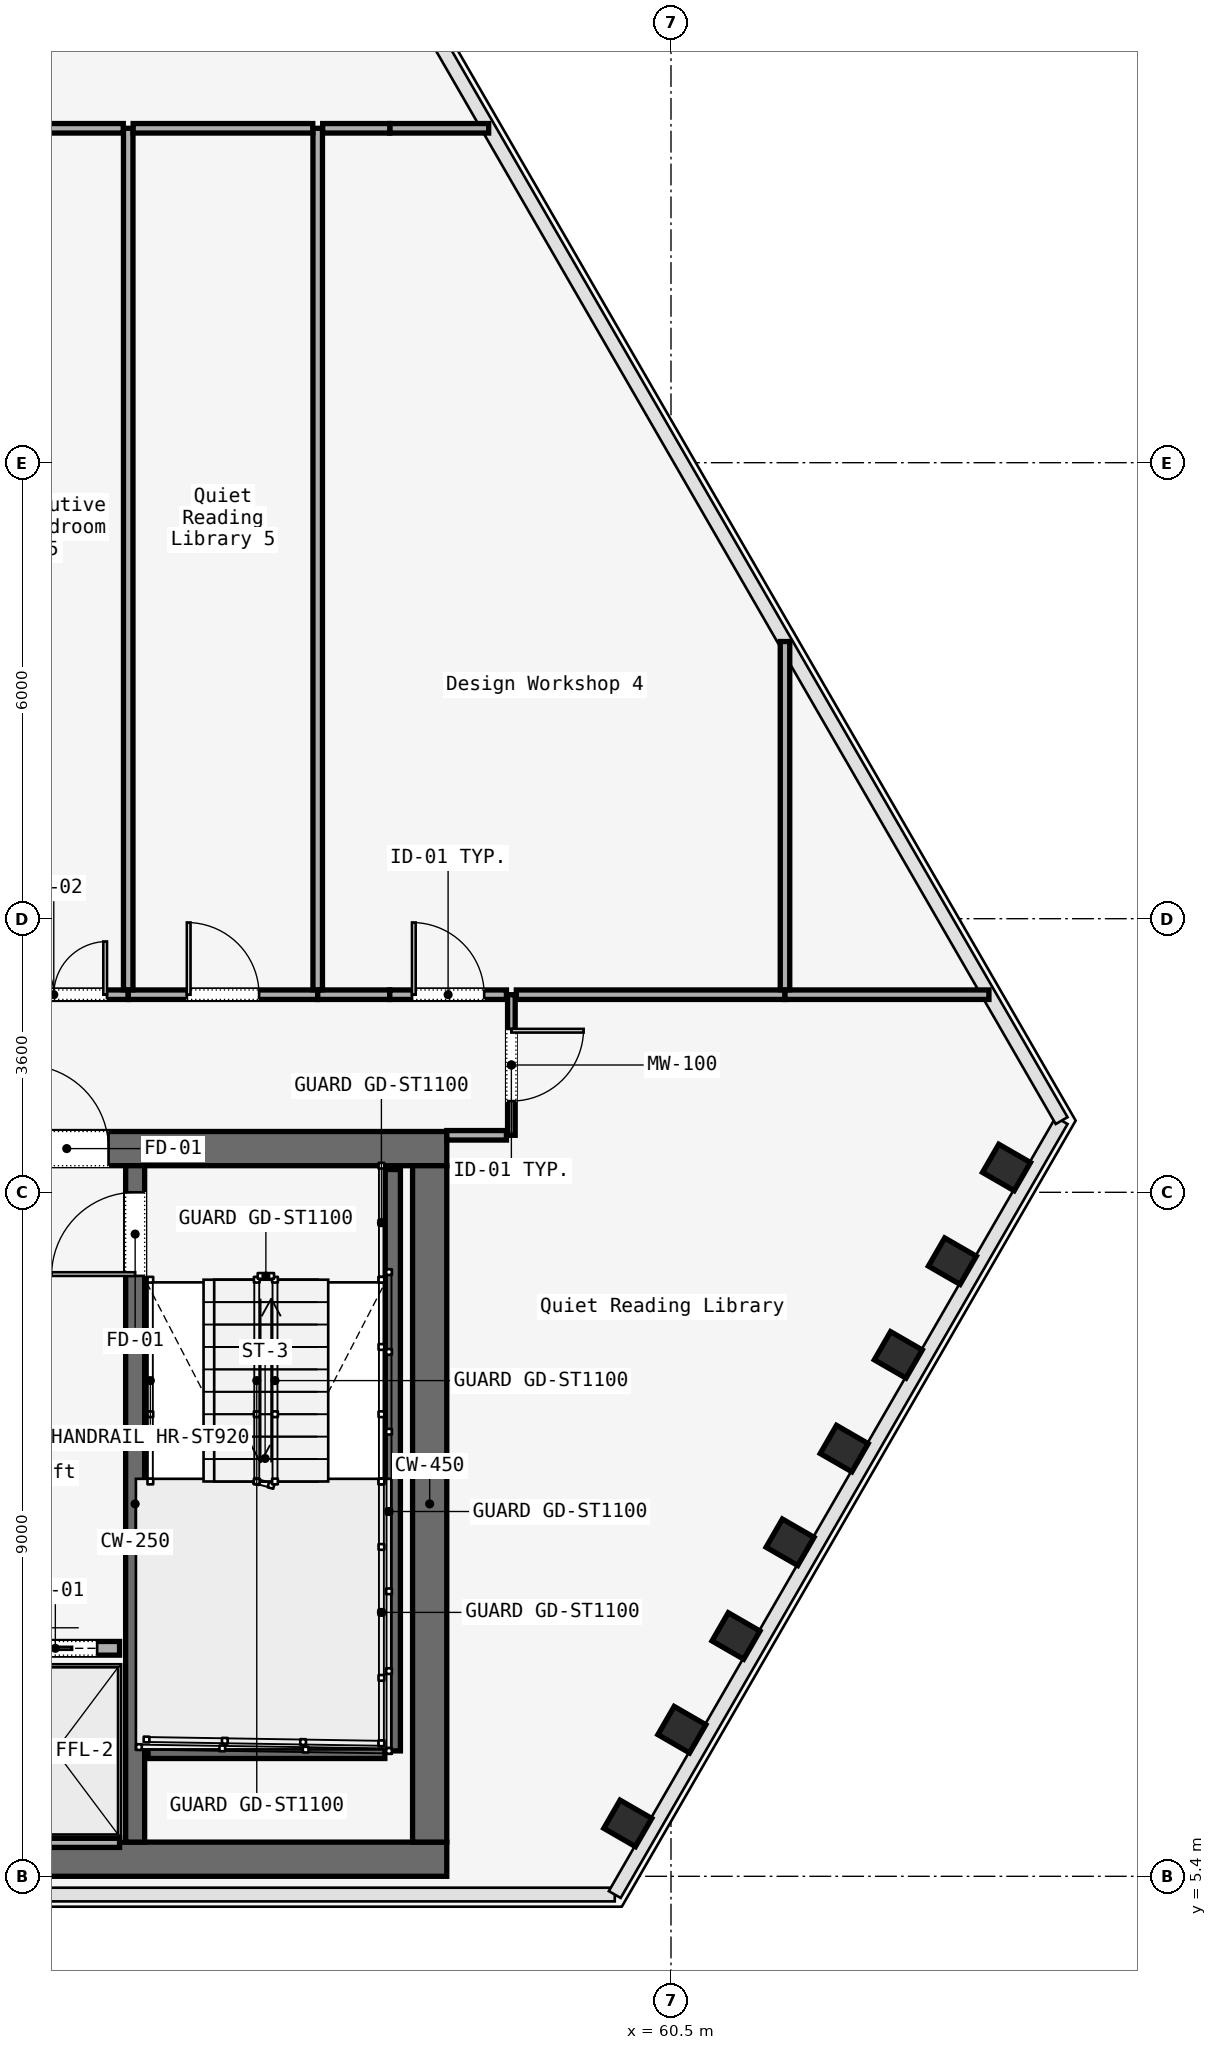
"""IFC4 building model, lengths in metres.
Left out: names, types, materials, properties, quantities, classifications, styles, units other than length and angle.
Written with IfcOpenShell. Run it as: python <this file> out.ifc"""

import sys

from ifc_helpers import new_model, si_unit, direction, frame, frame_2d, origin, origin_2d, place, context, subcontext, project, spatial, rectangle, i_section, extrude, element, fill, save


model = new_model("IFC4")
c1 = context("Model", 3, precision=1e-05, world=origin(), true_north=direction((0.0, 1.0)))
c2 = subcontext(c1, "Body", "Model", "MODEL_VIEW")
j1 = project(units=[si_unit("LENGTHUNIT", "METRE"), si_unit("PLANEANGLEUNIT", "RADIAN")], contexts=[c1])
p1 = place(None, origin())
s1 = spatial("IfcSite", under=j1, at=p1, CompositionType="ELEMENT")
p2 = place(p1, origin())
s2 = spatial("IfcBuilding", under=s1, at=p2, CompositionType="ELEMENT")
p3 = place(p2, frame((0.0, 0.0, 142.2)))
s3 = spatial("IfcBuildingStorey", under=s2, at=p3, CompositionType="ELEMENT", Elevation=142.2)
p4 = place(p3, frame((26.45, 14.975, 0.0), z_axis=(0.0, 0.0, 1.0), x_axis=(1.0, 0.0, 0.0)))
e1 = element("IfcWall", 1, at=p4, inside=s3, PredefinedType="SOLIDWALL", context=c2, shape_type="SweptSolid", body=[
    extrude(rectangle(XDim=31.1, YDim=0.45, at=frame_2d((15.55, 0.0))), origin(), (0.0, 0.0, 1.0), 3.58),
])
p5 = place(p4, frame((1.65, 0.0, 0.0)))
e2 = element("IfcOpeningElement", 2, at=p5, cuts=e1, PredefinedType="OPENING", context=c2, shape_type="SweptSolid", body=[
    extrude(rectangle(XDim=1.1, YDim=2.2, at=frame_2d((0.55, 1.1))), frame((0.0, 0.225, 0.0), z_axis=(0.0, -1.0, 0.0), x_axis=(1.0, 0.0, 0.0)), (0.0, 0.0, 1.0), 0.45),
])
p6 = place(p4, frame((13.65, 0.0, 0.0)))
e3 = element("IfcOpeningElement", 3, at=p6, cuts=e1, PredefinedType="OPENING", context=c2, shape_type="SweptSolid", body=[
    extrude(rectangle(XDim=1.1, YDim=2.2, at=frame_2d((0.55, 1.1))), frame((0.0, 0.225, 0.0), z_axis=(0.0, -1.0, 0.0), x_axis=(1.0, 0.0, 0.0)), (0.0, 0.0, 1.0), 0.45),
])
p7 = place(p4, frame((25.55, 0.0, 0.0)))
e4 = element("IfcOpeningElement", 4, at=p7, cuts=e1, PredefinedType="OPENING", context=c2, shape_type="SweptSolid", body=[
    extrude(rectangle(XDim=1.1, YDim=2.2, at=frame_2d((0.55, 1.1))), frame((0.0, 0.225, 0.0), z_axis=(0.0, -1.0, 0.0), x_axis=(1.0, 0.0, 0.0)), (0.0, 0.0, 1.0), 0.45),
])
p8 = place(p4, frame((10.7, 0.0, 0.0)))
e5 = element("IfcOpeningElement", 5, at=p8, cuts=e1, PredefinedType="OPENING", context=c2, shape_type="SweptSolid", body=[
    extrude(rectangle(XDim=1.4, YDim=2.2, at=frame_2d((0.7, 1.1))), frame((0.0, 0.225, 0.0), z_axis=(0.0, -1.0, 0.0), x_axis=(1.0, 0.0, 0.0)), (0.0, 0.0, 1.0), 0.45),
])
p9 = place(p4, frame((19.35, 0.0, 0.0)))
e6 = element("IfcOpeningElement", 6, at=p9, cuts=e1, PredefinedType="OPENING", context=c2, shape_type="SweptSolid", body=[
    extrude(rectangle(XDim=1.1, YDim=2.2, at=frame_2d((0.55, 1.1))), frame((0.0, 0.225, 0.0), z_axis=(0.0, -1.0, 0.0), x_axis=(1.0, 0.0, 0.0)), (0.0, 0.0, 1.0), 0.45),
])
p10 = place(p4, frame((21.4, 0.0, 0.0)))
e7 = element("IfcOpeningElement", 7, at=p10, cuts=e1, PredefinedType="OPENING", context=c2, shape_type="SweptSolid", body=[
    extrude(rectangle(XDim=0.9, YDim=2.1, at=frame_2d((0.45, 1.05))), frame((0.0, 0.225, 0.0), z_axis=(0.0, -1.0, 0.0), x_axis=(1.0, 0.0, 0.0)), (0.0, 0.0, 1.0), 0.45),
])
p11 = place(p4, frame((23.35, 0.0, 0.0)))
e8 = element("IfcOpeningElement", 8, at=p11, cuts=e1, PredefinedType="OPENING", context=c2, shape_type="SweptSolid", body=[
    extrude(rectangle(XDim=1.3, YDim=2.3, at=frame_2d((0.65, 1.15))), frame((0.0, 0.225, 0.0), z_axis=(0.0, -1.0, 0.0), x_axis=(1.0, 0.0, 0.0)), (0.0, 0.0, 1.0), 0.45),
])
p12 = place(p3, frame((26.45, 5.625, 0.0), z_axis=(0.0, 0.0, 1.0), x_axis=(1.0, 0.0, 0.0)))
e9 = element("IfcWall", 9, at=p12, inside=s3, PredefinedType="SOLIDWALL", context=c2, shape_type="SweptSolid", body=[
    extrude(rectangle(XDim=31.1, YDim=0.45, at=frame_2d((15.55, 0.0))), origin(), (0.0, 0.0, 1.0), 3.58),
])
p13 = place(p3, frame((57.325, 5.85, 0.0), z_axis=(0.0, 0.0, 1.0), x_axis=(0.0, 1.0, 0.0)))
e10 = element("IfcWall", 10, at=p13, inside=s3, PredefinedType="SOLIDWALL", context=c2, shape_type="SweptSolid", body=[
    extrude(rectangle(XDim=8.9, YDim=0.45, at=frame_2d((4.45, 0.0))), origin(), (0.0, 0.0, 1.0), 3.58),
])
p14 = place(p3, frame((53.45, 5.85, 0.0), z_axis=(0.0, 0.0, 1.0), x_axis=(0.0, 1.0, 0.0)))
e11 = element("IfcWall", 11, at=p14, inside=s3, PredefinedType="SOLIDWALL", context=c2, shape_type="SweptSolid", body=[
    extrude(rectangle(XDim=8.9, YDim=0.25, at=frame_2d((4.45, 0.0))), origin(), (0.0, 0.0, 1.0), 3.58),
])
p15 = place(p14, frame((7.45, 0.0, 0.0)))
e12 = element("IfcOpeningElement", 12, at=p15, cuts=e11, PredefinedType="OPENING", context=c2, shape_type="SweptSolid", body=[
    extrude(rectangle(XDim=1.1, YDim=2.2, at=frame_2d((0.55, 1.1))), frame((0.0, 0.125, 0.0), z_axis=(0.0, -1.0, 0.0), x_axis=(1.0, 0.0, 0.0)), (0.0, 0.0, 1.0), 0.25),
])
for number, where, z_axis, x_axis in (
    (13, (59.931, 6.096, 0.0), (0.0, 0.0, 1.0), (0.5, 0.866, 0.0)),
    (14, (60.643, 7.329, 0.0), (0.0, 0.0, 1.0), (0.5, 0.866, 0.0)),
    (15, (61.355, 8.562, 0.0), (0.0, 0.0, 1.0), (0.5, 0.866, 0.0)),
    (16, (62.067, 9.795, 0.0), (0.0, 0.0, 1.0), (0.5, 0.866, 0.0)),
    (17, (62.779, 11.028, 0.0), (0.0, 0.0, 1.0), (0.5, 0.866, 0.0)),
    (18, (63.49, 12.261, 0.0), (0.0, 0.0, 1.0), (0.5, 0.866, 0.0)),
    (19, (64.202, 13.494, 0.0), (0.0, 0.0, 1.0), (0.5, 0.866, 0.0)),
    (20, (64.914, 14.727, 0.0), (0.0, 0.0, 1.0), (0.5, 0.866, 0.0)),
):
    element("IfcColumn", number, at=place(p3, frame(where, z_axis=z_axis, x_axis=x_axis)), inside=s3, PredefinedType="COLUMN", context=c2, shape_type="SweptSolid", body=[
        extrude(i_section(OverallWidth=0.428, OverallDepth=0.481, WebThickness=0.051, FlangeThickness=0.065, FilletRadius=0.015, at=origin_2d()), origin(), (0.0, 0.0, 1.0), 3.58),
    ])
p16 = place(p3, frame((56.84, 14.7, 0.0), z_axis=(0.0, 0.0, 1.0), x_axis=(0.0, -1.0, 0.0)))
e21 = element("IfcWall", 21, at=p16, inside=s3, PredefinedType="SOLIDWALL", context=c2, shape_type="SweptSolid", body=[
    extrude(rectangle(XDim=7.65, YDim=0.2, at=frame_2d((3.825, 0.0))), origin(), (0.0, 0.0, 1.0), 3.8),
])
p17 = place(p3, frame((53.62, 7.05, 0.0), z_axis=(0.0, 0.0, 1.0), x_axis=(1.0, 0.0, 0.0)))
e22 = element("IfcWall", 22, at=p17, inside=s3, PredefinedType="SOLIDWALL", context=c2, shape_type="SweptSolid", body=[
    extrude(rectangle(XDim=3.115, YDim=0.2, at=frame_2d((1.558, 0.0))), origin(), (0.0, 0.0, 1.0), 3.8),
])
p18 = place(p3, frame((51.555, 8.4, 0.0), z_axis=(0.0, 0.0, 1.0), x_axis=(1.0, 0.0, 0.0)))
e23 = element("IfcWall", 23, at=p18, inside=s3, PredefinedType="SOLIDWALL", context=c2, shape_type="SweptSolid", body=[
    extrude(rectangle(XDim=1.69, YDim=0.18, at=frame_2d((0.845, 0.0))), origin(), (0.0, 0.0, 1.0), 3.01),
])
p19 = place(p18, frame((0.295, 0.0, 0.0)))
e24 = element("IfcOpeningElement", 24, at=p19, cuts=e23, PredefinedType="OPENING", context=c2, shape_type="SweptSolid", body=[
    extrude(rectangle(XDim=1.1, YDim=2.2, at=frame_2d((0.55, 1.1))), frame((0.0, 0.09, 0.0), z_axis=(0.0, -1.0, 0.0), x_axis=(1.0, 0.0, 0.0)), (0.0, 0.0, 1.0), 0.18),
])
p20 = place(p3, frame((51.555, 5.84, 0.0), z_axis=(0.0, 0.0, 1.0), x_axis=(1.0, 0.0, 0.0)))
e25 = element("IfcWall", 25, at=p20, inside=s3, PredefinedType="SOLIDWALL", context=c2, shape_type="SweptSolid", body=[
    extrude(rectangle(XDim=1.69, YDim=0.12, at=frame_2d((0.845, 0.0))), origin(), (0.0, 0.0, 1.0), 3.01),
])
p21 = place(p3, frame((58.4, 17.0, 0.0), z_axis=(0.0, 0.0, 1.0), x_axis=(0.0, -1.0, 0.0)))
e26 = element("IfcWall", 26, at=p21, inside=s3, PredefinedType="MOVABLE", context=c2, shape_type="SweptSolid", body=[
    extrude(rectangle(XDim=1.85, YDim=0.1, at=frame_2d((0.925, 0.0))), origin(), (0.0, 0.0, 1.0), 3.01),
])
p22 = place(p21, frame((0.45, 0.0, 0.0)))
e27 = element("IfcOpeningElement", 27, at=p22, cuts=e26, PredefinedType="OPENING", context=c2, shape_type="SweptSolid", body=[
    extrude(rectangle(XDim=0.95, YDim=2.2, at=frame_2d((0.475, 1.1))), frame((0.0, 0.05, 0.0), z_axis=(0.0, -1.0, 0.0), x_axis=(1.0, 0.0, 0.0)), (0.0, 0.0, 1.0), 0.1),
])
p23 = place(p3, frame((58.335, 15.15, 0.0), z_axis=(0.0, 0.0, 1.0), x_axis=(-1.0, 0.0, 0.0)))
e28 = element("IfcWall", 28, at=p23, inside=s3, PredefinedType="PARTITIONING", context=c2, shape_type="SweptSolid", body=[
    extrude(rectangle(XDim=0.785, YDim=0.125, at=frame_2d((0.393, 0.0))), origin(), (0.0, 0.0, 1.0), 3.01),
])
p24 = place(p3, frame((51.4, 17.0, 0.0), z_axis=(0.0, 0.0, 1.0), x_axis=(1.0, 0.0, 0.0)))
e29 = element("IfcWall", 29, at=p24, inside=s3, PredefinedType="PARTITIONING", context=c2, shape_type="SweptSolid", body=[
    extrude(rectangle(XDim=1.959, YDim=0.125, at=frame_2d((0.979, 0.0))), origin(), (0.0, 0.0, 1.0), 3.01),
])
p25 = place(p24, frame((0.279, 0.0, 0.0)))
e30 = element("IfcOpeningElement", 30, at=p25, cuts=e29, PredefinedType="OPENING", context=c2, shape_type="SweptSolid", body=[
    extrude(rectangle(XDim=1.4, YDim=2.2, at=frame_2d((0.7, 1.1))), frame((0.0, 0.062, 0.0), z_axis=(0.0, -1.0, 0.0), x_axis=(1.0, 0.0, 0.0)), (0.0, 0.0, 1.0), 0.125),
])
p26 = place(p3, frame((53.359, 17.0, 0.0), z_axis=(0.0, 0.0, 1.0), x_axis=(1.0, 0.0, 0.0)))
e31 = element("IfcWall", 31, at=p26, inside=s3, PredefinedType="PARTITIONING", context=c2, shape_type="SweptSolid", body=[
    extrude(rectangle(XDim=2.493, YDim=0.125, at=frame_2d((1.247, 0.0))), origin(), (0.0, 0.0, 1.0), 3.01),
])
p27 = place(p26, frame((0.771, 0.0, 0.0)))
e32 = element("IfcOpeningElement", 32, at=p27, cuts=e31, PredefinedType="OPENING", context=c2, shape_type="SweptSolid", body=[
    extrude(rectangle(XDim=0.95, YDim=2.2, at=frame_2d((0.475, 1.1))), frame((0.0, 0.062, 0.0), z_axis=(0.0, -1.0, 0.0), x_axis=(1.0, 0.0, 0.0)), (0.0, 0.0, 1.0), 0.125),
])
p28 = place(p3, frame((55.852, 17.0, 0.0), z_axis=(0.0, 0.0, 1.0), x_axis=(1.0, 0.0, 0.0)))
e33 = element("IfcWall", 33, at=p28, inside=s3, PredefinedType="PARTITIONING", context=c2, shape_type="SweptSolid", body=[
    extrude(rectangle(XDim=0.948, YDim=0.125, at=frame_2d((0.474, 0.0))), origin(), (0.0, 0.0, 1.0), 3.01),
])
p29 = place(p3, frame((56.8, 17.0, 0.0), z_axis=(0.0, 0.0, 1.0), x_axis=(1.0, 0.0, 0.0)))
e34 = element("IfcWall", 34, at=p29, inside=s3, PredefinedType="PARTITIONING", context=c2, shape_type="SweptSolid", body=[
    extrude(rectangle(XDim=1.535, YDim=0.125, at=frame_2d((0.768, 0.0))), origin(), (0.0, 0.0, 1.0), 3.01),
])
p30 = place(p29, frame((0.292, 0.0, 0.0)))
e35 = element("IfcOpeningElement", 35, at=p30, cuts=e34, PredefinedType="OPENING", context=c2, shape_type="SweptSolid", body=[
    extrude(rectangle(XDim=0.95, YDim=2.2, at=frame_2d((0.475, 1.1))), frame((0.0, 0.062, 0.0), z_axis=(0.0, -1.0, 0.0), x_axis=(1.0, 0.0, 0.0)), (0.0, 0.0, 1.0), 0.125),
])
p31 = place(p3, frame((58.465, 17.0, 0.0), z_axis=(0.0, 0.0, 1.0), x_axis=(1.0, 0.0, 0.0)))
e36 = element("IfcWall", 36, at=p31, inside=s3, PredefinedType="PARTITIONING", context=c2, shape_type="SweptSolid", body=[
    extrude(rectangle(XDim=3.535, YDim=0.125, at=frame_2d((1.768, 0.0))), origin(), (0.0, 0.0, 1.0), 3.01),
])
p32 = place(p3, frame((62.0, 17.0, 0.0), z_axis=(0.0, 0.0, 1.0), x_axis=(1.0, 0.0, 0.0)))
e37 = element("IfcWall", 37, at=p32, inside=s3, PredefinedType="PARTITIONING", context=c2, shape_type="SweptSolid", body=[
    extrude(rectangle(XDim=2.683, YDim=0.125, at=frame_2d((1.342, 0.0))), origin(), (0.0, 0.0, 1.0), 3.01),
])
p33 = place(p3, frame((56.8, 28.4, 0.0), z_axis=(0.0, 0.0, 1.0), x_axis=(1.0, 0.0, 0.0)))
e38 = element("IfcWall", 38, at=p33, inside=s3, PredefinedType="PARTITIONING", context=c2, shape_type="SweptSolid", body=[
    extrude(rectangle(XDim=1.301, YDim=0.125, at=frame_2d((0.651, 0.0))), origin(), (0.0, 0.0, 1.0), 3.01),
])
p34 = place(p3, frame((62.0, 21.647, 0.0), z_axis=(0.0, 0.0, 1.0), x_axis=(0.0, -1.0, 0.0)))
e39 = element("IfcWall", 39, at=p34, inside=s3, PredefinedType="PARTITIONING", context=c2, shape_type="SweptSolid", body=[
    extrude(rectangle(XDim=4.582, YDim=0.125, at=frame_2d((2.291, 0.0))), origin(), (0.0, 0.0, 1.0), 3.01),
])
p35 = place(p3, frame((55.852, 17.065, 0.0), z_axis=(0.0, 0.0, 1.0), x_axis=(0.0, 1.0, 0.0)))
e40 = element("IfcWall", 40, at=p35, inside=s3, PredefinedType="PARTITIONING", context=c2, shape_type="SweptSolid", body=[
    extrude(rectangle(XDim=11.335, YDim=0.125, at=frame_2d((5.667, 0.0))), origin(), (0.0, 0.0, 1.0), 3.01),
])
p36 = place(p3, frame((55.917, 28.4, 0.0), z_axis=(0.0, 0.0, 1.0), x_axis=(1.0, 0.0, 0.0)))
e41 = element("IfcWall", 41, at=p36, inside=s3, PredefinedType="PARTITIONING", context=c2, shape_type="SweptSolid", body=[
    extrude(rectangle(XDim=0.883, YDim=0.125, at=frame_2d((0.441, 0.0))), origin(), (0.0, 0.0, 1.0), 3.01),
])
p37 = place(p3, frame((53.359, 28.4, 0.0), z_axis=(0.0, 0.0, 1.0), x_axis=(0.0, -1.0, 0.0)))
e42 = element("IfcWall", 42, at=p37, inside=s3, PredefinedType="PARTITIONING", context=c2, shape_type="SweptSolid", body=[
    extrude(rectangle(XDim=11.335, YDim=0.125, at=frame_2d((5.667, 0.0))), origin(), (0.0, 0.0, 1.0), 3.01),
])
p38 = place(p3, frame((51.8, 28.4, 0.0), z_axis=(0.0, 0.0, 1.0), x_axis=(1.0, 0.0, 0.0)))
e43 = element("IfcWall", 43, at=p38, inside=s3, PredefinedType="PARTITIONING", context=c2, shape_type="SweptSolid", body=[
    extrude(rectangle(XDim=1.494, YDim=0.125, at=frame_2d((0.747, 0.0))), origin(), (0.0, 0.0, 1.0), 3.01),
])
p39 = place(p3, frame((53.424, 28.4, 0.0), z_axis=(0.0, 0.0, 1.0), x_axis=(1.0, 0.0, 0.0)))
e44 = element("IfcWall", 44, at=p39, inside=s3, PredefinedType="PARTITIONING", context=c2, shape_type="SweptSolid", body=[
    extrude(rectangle(XDim=2.363, YDim=0.125, at=frame_2d((1.182, 0.0))), origin(), (0.0, 0.0, 1.0), 3.01),
])
p40 = place(p7, origin())
e45 = element("IfcDoor", 45, at=p40, inside=s3, OperationType="SINGLE_SWING_RIGHT", PredefinedType="DOOR", context=c2, shape_type="SweptSolid", body=[
    extrude(rectangle(XDim=1.1, YDim=2.2, at=frame_2d((0.55, 1.1))), frame((0.0, 0.025, 0.0), z_axis=(0.0, -1.0, 0.0), x_axis=(1.0, 0.0, 0.0)), (0.0, 0.0, 1.0), 0.05),
])
fill(e4, e45)
p41 = place(p15, origin())
e46 = element("IfcDoor", 46, at=p41, inside=s3, OperationType="SINGLE_SWING_LEFT", PredefinedType="DOOR", context=c2, shape_type="SweptSolid", body=[
    extrude(rectangle(XDim=1.1, YDim=2.2, at=frame_2d((0.55, 1.1))), frame((0.0, 0.025, 0.0), z_axis=(0.0, -1.0, 0.0), x_axis=(1.0, 0.0, 0.0)), (0.0, 0.0, 1.0), 0.05),
])
fill(e12, e46)
p42 = place(p19, origin())
e47 = element("IfcDoor", 47, at=p42, inside=s3, OperationType="SLIDING_TO_LEFT", PredefinedType="DOOR", context=c2, shape_type="SweptSolid", body=[
    extrude(rectangle(XDim=1.1, YDim=2.2, at=frame_2d((0.55, 1.1))), frame((0.0, 0.025, 0.0), z_axis=(0.0, -1.0, 0.0), x_axis=(1.0, 0.0, 0.0)), (0.0, 0.0, 1.0), 0.05),
])
fill(e24, e47)
p43 = place(p22, origin())
e48 = element("IfcDoor", 48, at=p43, inside=s3, OperationType="SINGLE_SWING_LEFT", PredefinedType="DOOR", context=c2, shape_type="SweptSolid", body=[
    extrude(rectangle(XDim=0.95, YDim=2.2, at=frame_2d((0.475, 1.1))), frame((0.0, 0.025, 0.0), z_axis=(0.0, -1.0, 0.0), x_axis=(1.0, 0.0, 0.0)), (0.0, 0.0, 1.0), 0.05),
])
fill(e27, e48)
p44 = place(p30, origin())
e49 = element("IfcDoor", 49, at=p44, inside=s3, OperationType="SINGLE_SWING_LEFT", PredefinedType="DOOR", context=c2, shape_type="SweptSolid", body=[
    extrude(rectangle(XDim=0.95, YDim=2.2, at=frame_2d((0.475, 1.1))), frame((0.0, 0.025, 0.0), z_axis=(0.0, -1.0, 0.0), x_axis=(1.0, 0.0, 0.0)), (0.0, 0.0, 1.0), 0.05),
])
fill(e35, e49)
p45 = place(p25, origin())
e50 = element("IfcDoor", 50, at=p45, inside=s3, OperationType="SINGLE_SWING_RIGHT", PredefinedType="DOOR", context=c2, shape_type="SweptSolid", body=[
    extrude(rectangle(XDim=1.4, YDim=2.2, at=frame_2d((0.7, 1.1))), frame((0.0, 0.025, 0.0), z_axis=(0.0, -1.0, 0.0), x_axis=(1.0, 0.0, 0.0)), (0.0, 0.0, 1.0), 0.05),
])
fill(e30, e50)
p46 = place(p27, origin())
e51 = element("IfcDoor", 51, at=p46, inside=s3, OperationType="SINGLE_SWING_LEFT", PredefinedType="DOOR", context=c2, shape_type="SweptSolid", body=[
    extrude(rectangle(XDim=0.95, YDim=2.2, at=frame_2d((0.475, 1.1))), frame((0.0, 0.025, 0.0), z_axis=(0.0, -1.0, 0.0), x_axis=(1.0, 0.0, 0.0)), (0.0, 0.0, 1.0), 0.05),
])
fill(e32, e51)
save(model, sys.argv[1])
